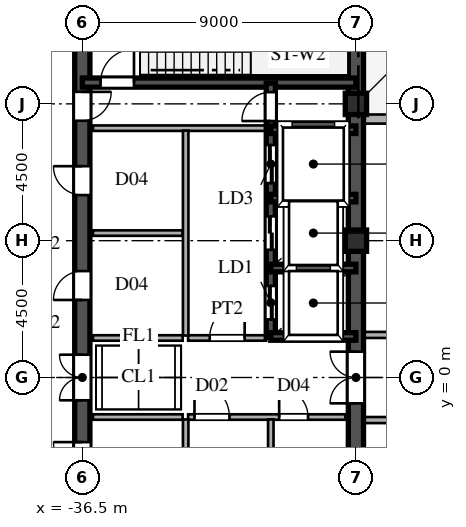
"""IFC4 building model, lengths in metres.
Left out: names, types, materials, properties, quantities, classifications, styles, units other than length and angle.
Written with IfcOpenShell. Run it as: python <this file> out.ifc"""

import sys

from ifc_helpers import new_model, si_unit, direction, frame, frame_2d, origin, origin_2d, place, context, subcontext, project, spatial, rectangle, hollow_rectangle, extrude, source, transform, mapped, element, fill, save


model = new_model("IFC4")
c1 = context("Model", 3, precision=1e-05, world=origin(), true_north=direction((0.0, 1.0)))
c2 = subcontext(c1, "Body", "Model", "MODEL_VIEW")
j1 = project(units=[si_unit("LENGTHUNIT", "METRE"), si_unit("PLANEANGLEUNIT", "RADIAN")], contexts=[c1])
p1 = place(None, origin())
s1 = spatial("IfcSite", under=j1, at=p1, CompositionType="ELEMENT")
p2 = place(p1, origin())
s2 = spatial("IfcBuilding", under=s1, at=p2, CompositionType="ELEMENT")
p3 = place(p2, frame((0.0, 0.0, 274.2)))
s3 = spatial("IfcBuildingStorey", under=s2, at=p3, CompositionType="ELEMENT", Elevation=274.2)
m1 = source(origin(), c2, "Body", "SweptSolid", [
    extrude(hollow_rectangle(XDim=0.7, YDim=0.7, WallThickness=0.03, at=origin_2d()), origin(), (0.0, 0.0, 1.0), 4.8),
])
for number, where, z_axis, x_axis in (
    (1, (-27.5, 4.5, 0.0), (0.0, 0.0, 1.0), (1.0, 0.0, 0.0)),
    (2, (-27.5, 9.0, 0.0), (0.0, 0.0, 1.0), (1.0, 0.0, 0.0)),
):
    element("IfcColumn", number, at=place(p3, frame(where, z_axis=z_axis, x_axis=x_axis)), inside=s3, PredefinedType="COLUMN", context=c2, shape_type="MappedRepresentation", body=[
        mapped(m1, transform((0.0, 0.0, 0.0), scale=1.0)),
    ])
p4 = place(p3, frame((-27.45, 8.5, 0.0), z_axis=(0.0, 0.0, 1.0), x_axis=(1.0, 0.0, 0.0)))
e3 = element("IfcWall", 3, at=p4, inside=s3, PredefinedType="SOLIDWALL", context=c2, shape_type="SweptSolid", body=[
    extrude(rectangle(XDim=54.9, YDim=0.3, at=frame_2d((27.45, 0.0))), origin(), (0.0, 0.0, 1.0), 4.52),
])
p5 = place(p4, frame((12.95, 0.0, 0.0)))
e4 = element("IfcOpeningElement", 4, at=p5, cuts=e3, PredefinedType="OPENING", context=c2, shape_type="SweptSolid", body=[
    extrude(rectangle(XDim=1.9, YDim=2.4, at=frame_2d((0.95, 1.2))), frame((0.0, 0.16, 0.0), z_axis=(0.0, -1.0, 0.0), x_axis=(1.0, 0.0, 0.0)), (0.0, 0.0, 1.0), 0.32),
])
p6 = place(p4, frame((23.95, 0.0, 0.0)))
e5 = element("IfcOpeningElement", 5, at=p6, cuts=e3, PredefinedType="OPENING", context=c2, shape_type="SweptSolid", body=[
    extrude(rectangle(XDim=1.9, YDim=2.4, at=frame_2d((0.95, 1.2))), frame((0.0, 0.16, 0.0), z_axis=(0.0, -1.0, 0.0), x_axis=(1.0, 0.0, 0.0)), (0.0, 0.0, 1.0), 0.32),
])
p7 = place(p4, frame((6.95, 0.0, 0.8)))
e6 = element("IfcOpeningElement", 6, at=p7, cuts=e3, PredefinedType="OPENING", context=c2, shape_type="SweptSolid", body=[
    extrude(rectangle(XDim=2.8, YDim=2.1, at=frame_2d((1.4, 1.05))), frame((0.0, 0.16, 0.0), z_axis=(0.0, -1.0, 0.0), x_axis=(1.0, 0.0, 0.0)), (0.0, 0.0, 1.0), 0.32),
])
p8 = place(p4, frame((17.95, 0.0, 0.8)))
e7 = element("IfcOpeningElement", 7, at=p8, cuts=e3, PredefinedType="OPENING", context=c2, shape_type="SweptSolid", body=[
    extrude(rectangle(XDim=2.8, YDim=2.1, at=frame_2d((1.4, 1.05))), frame((0.0, 0.16, 0.0), z_axis=(0.0, -1.0, 0.0), x_axis=(1.0, 0.0, 0.0)), (0.0, 0.0, 1.0), 0.32),
])
p9 = place(p4, frame((28.95, 0.0, 0.8)))
e8 = element("IfcOpeningElement", 8, at=p9, cuts=e3, PredefinedType="OPENING", context=c2, shape_type="SweptSolid", body=[
    extrude(rectangle(XDim=2.8, YDim=2.1, at=frame_2d((1.4, 1.05))), frame((0.0, 0.16, 0.0), z_axis=(0.0, -1.0, 0.0), x_axis=(1.0, 0.0, 0.0)), (0.0, 0.0, 1.0), 0.32),
])
for number, where, z_axis, x_axis in (
    (9, (-27.5, -13.5, 0.0), (0.0, 0.0, 1.0), (0.0, 1.0, 0.0)),
    (10, (-27.5, 1.3, 0.0), (0.0, 0.0, 1.0), (0.0, 1.0, 0.0)),
):
    element("IfcWall", number, at=place(p3, frame(where, z_axis=z_axis, x_axis=x_axis)), inside=s3, PredefinedType="SHEAR", context=c2, shape_type="SweptSolid", body=[
        extrude(rectangle(XDim=12.2, YDim=0.5, at=frame_2d((6.1, 0.0))), origin(), (0.0, 0.0, 1.0), 4.52),
    ])
p10 = place(p3, frame((-27.5, -1.3, 0.0), z_axis=(0.0, 0.0, 1.0), x_axis=(0.0, 1.0, 0.0)))
e11 = element("IfcWall", 11, at=p10, inside=s3, PredefinedType="SHEAR", context=c2, shape_type="SweptSolid", body=[
    extrude(rectangle(XDim=2.6, YDim=0.5, at=frame_2d((1.3, 0.0))), origin(), (0.0, 0.0, 1.0), 4.52),
])
p11 = place(p10, frame((0.45, 0.0, 0.0)))
e12 = element("IfcOpeningElement", 12, at=p11, cuts=e11, PredefinedType="OPENING", context=c2, shape_type="SweptSolid", body=[
    extrude(rectangle(XDim=1.7, YDim=2.35, at=frame_2d((0.85, 1.175))), frame((0.0, 0.26, 0.0), z_axis=(0.0, -1.0, 0.0), x_axis=(1.0, 0.0, 0.0)), (0.0, 0.0, 1.0), 0.52),
])
p12 = place(p3, frame((-36.5, -1.3, 0.0), z_axis=(0.0, 0.0, 1.0), x_axis=(0.0, 1.0, 0.0)))
e13 = element("IfcWall", 13, at=p12, inside=s3, PredefinedType="SHEAR", context=c2, shape_type="SweptSolid", body=[
    extrude(rectangle(XDim=2.6, YDim=0.5, at=frame_2d((1.3, 0.0))), origin(), (0.0, 0.0, 1.0), 4.52),
])
p13 = place(p12, frame((0.55, 0.0, 0.0)))
e14 = element("IfcOpeningElement", 14, at=p13, cuts=e13, PredefinedType="OPENING", context=c2, shape_type="SweptSolid", body=[
    extrude(rectangle(XDim=1.5, YDim=2.3, at=frame_2d((0.75, 1.15))), frame((0.0, 0.26, 0.0), z_axis=(0.0, -1.0, 0.0), x_axis=(1.0, 0.0, 0.0)), (0.0, 0.0, 1.0), 0.52),
])
p14 = place(p3, frame((-36.5, 8.2, 0.0), z_axis=(0.0, 0.0, 1.0), x_axis=(0.0, 1.0, 0.0)))
e15 = element("IfcWall", 15, at=p14, inside=s3, PredefinedType="SHEAR", context=c2, shape_type="SweptSolid", body=[
    extrude(rectangle(XDim=5.45, YDim=0.5, at=frame_2d((2.725, 0.0))), origin(), (0.0, 0.0, 1.0), 4.52),
])
p15 = place(p14, frame((0.245, 0.0, 0.0)))
e16 = element("IfcOpeningElement", 16, at=p15, cuts=e15, PredefinedType="OPENING", context=c2, shape_type="SweptSolid", body=[
    extrude(rectangle(XDim=0.95, YDim=2.15, at=frame_2d((0.475, 1.075))), frame((0.0, 0.26, 0.0), z_axis=(0.0, -1.0, 0.0), x_axis=(1.0, 0.0, 0.0)), (0.0, 0.0, 1.0), 0.52),
])
p16 = place(p3, frame((-36.5, -3.9, 0.0), z_axis=(0.0, 0.0, 1.0), x_axis=(0.0, 1.0, 0.0)))
e17 = element("IfcWall", 17, at=p16, inside=s3, PredefinedType="SHEAR", context=c2, shape_type="SweptSolid", body=[
    extrude(rectangle(XDim=2.6, YDim=0.5, at=frame_2d((1.3, 0.0))), origin(), (0.0, 0.0, 1.0), 4.52),
])
p17 = place(p16, frame((0.825, 0.0, 0.0)))
e18 = element("IfcOpeningElement", 18, at=p17, cuts=e17, PredefinedType="OPENING", context=c2, shape_type="SweptSolid", body=[
    extrude(rectangle(XDim=0.95, YDim=2.15, at=frame_2d((0.475, 1.075))), frame((0.0, 0.26, 0.0), z_axis=(0.0, -1.0, 0.0), x_axis=(1.0, 0.0, 0.0)), (0.0, 0.0, 1.0), 0.52),
])
p18 = place(p3, frame((-36.5, 1.3, 0.0), z_axis=(0.0, 0.0, 1.0), x_axis=(0.0, 1.0, 0.0)))
e19 = element("IfcWall", 19, at=p18, inside=s3, PredefinedType="SHEAR", context=c2, shape_type="SweptSolid", body=[
    extrude(rectangle(XDim=3.45, YDim=0.5, at=frame_2d((1.725, 0.0))), origin(), (0.0, 0.0, 1.0), 4.52),
])
p19 = place(p18, frame((1.25, 0.0, 0.0)))
e20 = element("IfcOpeningElement", 20, at=p19, cuts=e19, PredefinedType="OPENING", context=c2, shape_type="SweptSolid", body=[
    extrude(rectangle(XDim=0.95, YDim=2.15, at=frame_2d((0.475, 1.075))), frame((0.0, 0.26, 0.0), z_axis=(0.0, -1.0, 0.0), x_axis=(1.0, 0.0, 0.0)), (0.0, 0.0, 1.0), 0.52),
])
p20 = place(p3, frame((-36.5, 4.75, 0.0), z_axis=(0.0, 0.0, 1.0), x_axis=(0.0, 1.0, 0.0)))
e21 = element("IfcWall", 21, at=p20, inside=s3, PredefinedType="SHEAR", context=c2, shape_type="SweptSolid", body=[
    extrude(rectangle(XDim=3.45, YDim=0.5, at=frame_2d((1.725, 0.0))), origin(), (0.0, 0.0, 1.0), 4.52),
])
p21 = place(p20, frame((1.25, 0.0, 0.0)))
e22 = element("IfcOpeningElement", 22, at=p21, cuts=e21, PredefinedType="OPENING", context=c2, shape_type="SweptSolid", body=[
    extrude(rectangle(XDim=0.95, YDim=2.15, at=frame_2d((0.475, 1.075))), frame((0.0, 0.26, 0.0), z_axis=(0.0, -1.0, 0.0), x_axis=(1.0, 0.0, 0.0)), (0.0, 0.0, 1.0), 0.52),
])
p22 = place(p3, frame((-36.5, 9.7, 0.0), z_axis=(0.0, 0.0, 1.0), x_axis=(1.0, 0.0, 0.0)))
e23 = element("IfcWall", 23, at=p22, inside=s3, PredefinedType="SHEAR", context=c2, shape_type="SweptSolid", body=[
    extrude(rectangle(XDim=9.0, YDim=0.3, at=frame_2d((4.5, 0.0))), origin(), (0.0, 0.0, 1.0), 4.52),
])
p23 = place(p22, frame((0.6, 0.0, 0.0)))
e24 = element("IfcOpeningElement", 24, at=p23, cuts=e23, PredefinedType="OPENING", context=c2, shape_type="SweptSolid", body=[
    extrude(rectangle(XDim=1.1, YDim=2.2, at=frame_2d((0.55, 1.1))), frame((0.0, 0.16, 0.0), z_axis=(0.0, -1.0, 0.0), x_axis=(1.0, 0.0, 0.0)), (0.0, 0.0, 1.0), 0.32),
])
for number, where, z_axis, x_axis in (
    (25, (-30.3, 1.35, 0.0), (0.0, 0.0, 1.0), (1.0, 0.0, 0.0)),
    (26, (-30.3, 3.6, 0.0), (0.0, 0.0, 1.0), (1.0, 0.0, 0.0)),
    (27, (-30.3, 5.9, 0.0), (0.0, 0.0, 1.0), (1.0, 0.0, 0.0)),
    (28, (-30.3, 8.15, 0.0), (0.0, 0.0, 1.0), (1.0, 0.0, 0.0)),
):
    element("IfcWall", number, at=place(p3, frame(where, z_axis=z_axis, x_axis=x_axis)), inside=s3, PredefinedType="SHEAR", context=c2, shape_type="SweptSolid", body=[
        extrude(rectangle(XDim=2.8, YDim=0.25, at=frame_2d((1.4, 0.0))), origin(), (0.0, 0.0, 1.0), 4.52),
    ])
p24 = place(p3, frame((-30.3, 1.32, 0.0), z_axis=(0.0, 0.0, 1.0), x_axis=(0.0, 1.0, 0.0)))
e29 = element("IfcWall", 29, at=p24, inside=s3, PredefinedType="SHEAR", context=c2, shape_type="SweptSolid", body=[
    extrude(rectangle(XDim=2.28, YDim=0.3, at=frame_2d((1.14, 0.0))), origin(), (0.0, 0.0, 1.0), 4.52),
])
p25 = place(p24, frame((0.59, 0.0, 0.0)))
e30 = element("IfcOpeningElement", 30, at=p25, cuts=e29, PredefinedType="OPENING", context=c2, shape_type="SweptSolid", body=[
    extrude(rectangle(XDim=1.1, YDim=2.2, at=frame_2d((0.55, 1.1))), frame((0.0, 0.16, 0.0), z_axis=(0.0, -1.0, 0.0), x_axis=(1.0, 0.0, 0.0)), (0.0, 0.0, 1.0), 0.32),
])
p26 = place(p3, frame((-30.3, 3.6, 0.0), z_axis=(0.0, 0.0, 1.0), x_axis=(0.0, 1.0, 0.0)))
e31 = element("IfcWall", 31, at=p26, inside=s3, PredefinedType="SHEAR", context=c2, shape_type="SweptSolid", body=[
    extrude(rectangle(XDim=2.3, YDim=0.3, at=frame_2d((1.15, 0.0))), origin(), (0.0, 0.0, 1.0), 4.52),
])
p27 = place(p26, frame((0.6, 0.0, 0.0)))
e32 = element("IfcOpeningElement", 32, at=p27, cuts=e31, PredefinedType="OPENING", context=c2, shape_type="SweptSolid", body=[
    extrude(rectangle(XDim=1.1, YDim=2.2, at=frame_2d((0.55, 1.1))), frame((0.0, 0.16, 0.0), z_axis=(0.0, -1.0, 0.0), x_axis=(1.0, 0.0, 0.0)), (0.0, 0.0, 1.0), 0.32),
])
p28 = place(p3, frame((-30.3, 5.9, 0.0), z_axis=(0.0, 0.0, 1.0), x_axis=(0.0, 1.0, 0.0)))
e33 = element("IfcWall", 33, at=p28, inside=s3, PredefinedType="SHEAR", context=c2, shape_type="SweptSolid", body=[
    extrude(rectangle(XDim=2.25, YDim=0.3, at=frame_2d((1.125, 0.0))), origin(), (0.0, 0.0, 1.0), 4.52),
])
p29 = place(p28, frame((0.495, 0.0, 0.0)))
e34 = element("IfcOpeningElement", 34, at=p29, cuts=e33, PredefinedType="OPENING", context=c2, shape_type="SweptSolid", body=[
    extrude(rectangle(XDim=1.25, YDim=2.3, at=frame_2d((0.625, 1.15))), frame((0.0, 0.16, 0.0), z_axis=(0.0, -1.0, 0.0), x_axis=(1.0, 0.0, 0.0)), (0.0, 0.0, 1.0), 0.32),
])
p30 = place(p3, frame((-30.3, 8.15, 0.0), z_axis=(0.0, 0.0, 1.0), x_axis=(0.0, 1.0, 0.0)))
e35 = element("IfcWall", 35, at=p30, inside=s3, PredefinedType="SHEAR", context=c2, shape_type="SweptSolid", body=[
    extrude(rectangle(XDim=1.53, YDim=0.3, at=frame_2d((0.765, 0.0))), origin(), (0.0, 0.0, 1.0), 4.52),
])
p31 = place(p30, frame((0.285, 0.0, 0.0)))
e36 = element("IfcOpeningElement", 36, at=p31, cuts=e35, PredefinedType="OPENING", context=c2, shape_type="SweptSolid", body=[
    extrude(rectangle(XDim=0.95, YDim=2.15, at=frame_2d((0.475, 1.075))), frame((0.0, 0.16, 0.0), z_axis=(0.0, -1.0, 0.0), x_axis=(1.0, 0.0, 0.0)), (0.0, 0.0, 1.0), 0.32),
])
p32 = place(p3, frame((-36.15, 8.2, 0.0), z_axis=(0.0, 0.0, 1.0), x_axis=(1.0, 0.0, 0.0)))
e37 = element("IfcWall", 37, at=p32, inside=s3, PredefinedType="PARTITIONING", context=c2, shape_type="SweptSolid", body=[
    extrude(rectangle(XDim=5.7, YDim=0.18, at=frame_2d((2.85, 0.0))), origin(), (0.0, 0.0, 1.0), 4.52),
])
p33 = place(p3, frame((-33.1, -6.42, 0.0), z_axis=(0.0, 0.0, 1.0), x_axis=(0.0, 1.0, 0.0)))
e38 = element("IfcWall", 38, at=p33, inside=s3, PredefinedType="PARTITIONING", context=c2, shape_type="SweptSolid", body=[
    extrude(rectangle(XDim=5.04, YDim=0.18, at=frame_2d((2.52, 0.0))), origin(), (0.0, 0.0, 1.0), 4.52),
])
p34 = place(p3, frame((-33.1, 1.38, 0.0), z_axis=(0.0, 0.0, 1.0), x_axis=(0.0, 1.0, 0.0)))
e39 = element("IfcWall", 39, at=p34, inside=s3, PredefinedType="PARTITIONING", context=c2, shape_type="SweptSolid", body=[
    extrude(rectangle(XDim=6.74, YDim=0.18, at=frame_2d((3.37, 0.0))), origin(), (0.0, 0.0, 1.0), 4.52),
])
p35 = place(p3, frame((-30.3, -1.3, 0.0), z_axis=(0.0, 0.0, 1.0), x_axis=(1.0, 0.0, 0.0)))
e40 = element("IfcWall", 40, at=p35, inside=s3, PredefinedType="PARTITIONING", context=c2, shape_type="SweptSolid", body=[
    extrude(rectangle(XDim=2.45, YDim=0.18, at=frame_2d((1.225, 0.0))), origin(), (0.0, 0.0, 1.0), 4.52),
])
p36 = place(p35, frame((0.275, 0.0, 0.0)))
e41 = element("IfcOpeningElement", 41, at=p36, cuts=e40, PredefinedType="OPENING", context=c2, shape_type="SweptSolid", body=[
    extrude(rectangle(XDim=0.95, YDim=2.15, at=frame_2d((0.475, 1.075))), frame((0.0, 0.1, 0.0), z_axis=(0.0, -1.0, 0.0), x_axis=(1.0, 0.0, 0.0)), (0.0, 0.0, 1.0), 0.2),
])
p37 = place(p3, frame((-33.02, -1.3, 0.0), z_axis=(0.0, 0.0, 1.0), x_axis=(1.0, 0.0, 0.0)))
e42 = element("IfcWall", 42, at=p37, inside=s3, PredefinedType="PARTITIONING", context=c2, shape_type="SweptSolid", body=[
    extrude(rectangle(XDim=2.72, YDim=0.18, at=frame_2d((1.36, 0.0))), origin(), (0.0, 0.0, 1.0), 4.52),
])
p38 = place(p37, frame((0.21, 0.0, 0.0)))
e43 = element("IfcOpeningElement", 43, at=p38, cuts=e42, PredefinedType="OPENING", context=c2, shape_type="SweptSolid", body=[
    extrude(rectangle(XDim=1.15, YDim=2.2, at=frame_2d((0.575, 1.1))), frame((0.0, 0.1, 0.0), z_axis=(0.0, -1.0, 0.0), x_axis=(1.0, 0.0, 0.0)), (0.0, 0.0, 1.0), 0.2),
])
p39 = place(p3, frame((-30.3, -7.12, 0.0), z_axis=(0.0, 0.0, 1.0), x_axis=(0.0, 1.0, 0.0)))
e44 = element("IfcWall", 44, at=p39, inside=s3, PredefinedType="PARTITIONING", context=c2, shape_type="SweptSolid", body=[
    extrude(rectangle(XDim=5.74, YDim=0.18, at=frame_2d((2.87, 0.0))), origin(), (0.0, 0.0, 1.0), 4.52),
])
p40 = place(p3, frame((-33.02, 1.3, 0.0), z_axis=(0.0, 0.0, 1.0), x_axis=(1.0, 0.0, 0.0)))
e45 = element("IfcWall", 45, at=p40, inside=s3, PredefinedType="PARTITIONING", context=c2, shape_type="SweptSolid", body=[
    extrude(rectangle(XDim=2.57, YDim=0.18, at=frame_2d((1.285, 0.0))), origin(), (0.0, 0.0, 1.0), 4.52),
])
p41 = place(p40, frame((0.71, 0.0, 0.0)))
e46 = element("IfcOpeningElement", 46, at=p41, cuts=e45, PredefinedType="OPENING", context=c2, shape_type="SweptSolid", body=[
    extrude(rectangle(XDim=1.15, YDim=2.2, at=frame_2d((0.575, 1.1))), frame((0.0, 0.1, 0.0), z_axis=(0.0, -1.0, 0.0), x_axis=(1.0, 0.0, 0.0)), (0.0, 0.0, 1.0), 0.2),
])
for number, where, z_axis, x_axis in (
    (47, (-36.15, -1.3, 0.0), (0.0, 0.0, 1.0), (1.0, 0.0, 0.0)),
    (48, (-36.15, 1.3, 0.0), (0.0, 0.0, 1.0), (1.0, 0.0, 0.0)),
    (49, (-36.15, 4.75, 0.0), (0.0, 0.0, 1.0), (1.0, 0.0, 0.0)),
):
    element("IfcWall", number, at=place(p3, frame(where, z_axis=z_axis, x_axis=x_axis)), inside=s3, PredefinedType="PARTITIONING", context=c2, shape_type="SweptSolid", body=[
        extrude(rectangle(XDim=2.95, YDim=0.18, at=frame_2d((1.475, 0.0))), origin(), (0.0, 0.0, 1.0), 4.52),
    ])
p42 = place(p3, frame((-27.245, -1.4, 0.0), z_axis=(0.0, 0.0, 1.0), x_axis=(1.0, 0.0, 0.0)))
e50 = element("IfcWall", 50, at=p42, inside=s3, PredefinedType="PARTITIONING", context=c2, shape_type="SweptSolid", body=[
    extrude(rectangle(XDim=54.49, YDim=0.2, at=frame_2d((27.245, 0.0))), origin(), (0.0, 0.0, 1.0), 4.52),
])
p43 = place(p42, frame((17.67, 0.0, 0.0)))
e51 = element("IfcOpeningElement", 51, at=p43, cuts=e50, PredefinedType="OPENING", context=c2, shape_type="SweptSolid", body=[
    extrude(rectangle(XDim=1.15, YDim=2.2, at=frame_2d((0.575, 1.1))), frame((0.0, 0.11, 0.0), z_axis=(0.0, -1.0, 0.0), x_axis=(1.0, 0.0, 0.0)), (0.0, 0.0, 1.0), 0.22),
])
p44 = place(p42, frame((35.17, 0.0, 0.0)))
e52 = element("IfcOpeningElement", 52, at=p44, cuts=e50, PredefinedType="OPENING", context=c2, shape_type="SweptSolid", body=[
    extrude(rectangle(XDim=1.15, YDim=2.2, at=frame_2d((0.575, 1.1))), frame((0.0, 0.11, 0.0), z_axis=(0.0, -1.0, 0.0), x_axis=(1.0, 0.0, 0.0)), (0.0, 0.0, 1.0), 0.22),
])
p45 = place(p3, frame((-27.245, 1.4, 0.0), z_axis=(0.0, 0.0, 1.0), x_axis=(1.0, 0.0, 0.0)))
e53 = element("IfcWall", 53, at=p45, inside=s3, PredefinedType="PARTITIONING", context=c2, shape_type="SweptSolid", body=[
    extrude(rectangle(XDim=54.49, YDim=0.2, at=frame_2d((27.245, 0.0))), origin(), (0.0, 0.0, 1.0), 4.52),
])
p46 = place(p45, frame((17.67, 0.0, 0.0)))
e54 = element("IfcOpeningElement", 54, at=p46, cuts=e53, PredefinedType="OPENING", context=c2, shape_type="SweptSolid", body=[
    extrude(rectangle(XDim=1.15, YDim=2.2, at=frame_2d((0.575, 1.1))), frame((0.0, 0.11, 0.0), z_axis=(0.0, -1.0, 0.0), x_axis=(1.0, 0.0, 0.0)), (0.0, 0.0, 1.0), 0.22),
])
p47 = place(p45, frame((41.805, 0.0, 0.0)))
e55 = element("IfcOpeningElement", 55, at=p47, cuts=e53, PredefinedType="OPENING", context=c2, shape_type="SweptSolid", body=[
    extrude(rectangle(XDim=0.88, YDim=2.1, at=frame_2d((0.44, 1.05))), frame((0.0, 0.11, 0.0), z_axis=(0.0, -1.0, 0.0), x_axis=(1.0, 0.0, 0.0)), (0.0, 0.0, 1.0), 0.22),
])
p48 = place(p45, frame((49.905, 0.0, 0.0)))
e56 = element("IfcOpeningElement", 56, at=p48, cuts=e53, PredefinedType="OPENING", context=c2, shape_type="SweptSolid", body=[
    extrude(rectangle(XDim=0.88, YDim=2.1, at=frame_2d((0.44, 1.05))), frame((0.0, 0.11, 0.0), z_axis=(0.0, -1.0, 0.0), x_axis=(1.0, 0.0, 0.0)), (0.0, 0.0, 1.0), 0.22),
])
m2 = source(origin(), c2, "Body", "SweptSolid", [
    extrude(rectangle(XDim=1.7, YDim=2.35, at=frame_2d((0.85, 1.175))), frame((0.0, 0.025, 0.0), z_axis=(0.0, -1.0, 0.0), x_axis=(1.0, 0.0, 0.0)), (0.0, 0.0, 1.0), 0.05),
])
p49 = place(p11, origin())
e57 = element("IfcDoor", 57, at=p49, inside=s3, OperationType="DOUBLE_SWING_LEFT", PredefinedType="DOOR", context=c2, shape_type="MappedRepresentation", body=[
    mapped(m2, transform((0.0, 0.0, 0.0), scale=1.0)),
])
fill(e12, e57)
m3 = source(origin(), c2, "Body", "SweptSolid", [
    extrude(rectangle(XDim=1.5, YDim=2.3, at=frame_2d((0.75, 1.15))), frame((0.0, 0.025, 0.0), z_axis=(0.0, -1.0, 0.0), x_axis=(1.0, 0.0, 0.0)), (0.0, 0.0, 1.0), 0.05),
])
p50 = place(p13, origin())
e58 = element("IfcDoor", 58, at=p50, inside=s3, OperationType="DOUBLE_SWING_LEFT", PredefinedType="DOOR", context=c2, shape_type="MappedRepresentation", body=[
    mapped(m3, transform((0.0, 0.0, 0.0), scale=1.0)),
])
fill(e14, e58)
m4 = source(origin(), c2, "Body", "SweptSolid", [
    extrude(rectangle(XDim=0.95, YDim=2.15, at=frame_2d((0.475, 1.075))), frame((0.0, 0.025, 0.0), z_axis=(0.0, -1.0, 0.0), x_axis=(1.0, 0.0, 0.0)), (0.0, 0.0, 1.0), 0.05),
])
p51 = place(p15, frame((0.95, 0.0, 0.0), z_axis=(0.0, 0.0, 1.0), x_axis=(-1.0, 0.0, 0.0)))
e59 = element("IfcDoor", 59, at=p51, inside=s3, OperationType="SINGLE_SWING_RIGHT", PredefinedType="DOOR", context=c2, shape_type="MappedRepresentation", body=[
    mapped(m4, transform((0.0, 0.0, 0.0), scale=1.0)),
])
fill(e16, e59)
p52 = place(p17, origin())
e60 = element("IfcDoor", 60, at=p52, inside=s3, OperationType="SINGLE_SWING_RIGHT", PredefinedType="DOOR", context=c2, shape_type="MappedRepresentation", body=[
    mapped(m4, transform((0.0, 0.0, 0.0), scale=1.0)),
])
fill(e18, e60)
p53 = place(p19, origin())
e61 = element("IfcDoor", 61, at=p53, inside=s3, OperationType="SINGLE_SWING_LEFT", PredefinedType="DOOR", context=c2, shape_type="MappedRepresentation", body=[
    mapped(m4, transform((0.0, 0.0, 0.0), scale=1.0)),
])
fill(e20, e61)
p54 = place(p21, origin())
e62 = element("IfcDoor", 62, at=p54, inside=s3, OperationType="SINGLE_SWING_RIGHT", PredefinedType="DOOR", context=c2, shape_type="MappedRepresentation", body=[
    mapped(m4, transform((0.0, 0.0, 0.0), scale=1.0)),
])
fill(e22, e62)
m5 = source(origin(), c2, "Body", "SweptSolid", [
    extrude(rectangle(XDim=1.1, YDim=2.2, at=frame_2d((0.55, 1.1))), frame((0.0, 0.025, 0.0), z_axis=(0.0, -1.0, 0.0), x_axis=(1.0, 0.0, 0.0)), (0.0, 0.0, 1.0), 0.05),
])
p55 = place(p23, origin())
e63 = element("IfcDoor", 63, at=p55, inside=s3, OperationType="SINGLE_SWING_RIGHT", PredefinedType="DOOR", context=c2, shape_type="MappedRepresentation", body=[
    mapped(m5, transform((0.0, 0.0, 0.0), scale=1.0)),
])
fill(e24, e63)
m6 = source(origin(), c2, "Body", "SweptSolid", [
    extrude(rectangle(XDim=1.1, YDim=2.2, at=frame_2d((0.55, 1.1))), frame((0.0, 0.025, 0.0), z_axis=(0.0, -1.0, 0.0), x_axis=(1.0, 0.0, 0.0)), (0.0, 0.0, 1.0), 0.05),
])
p56 = place(p25, origin())
e64 = element("IfcDoor", 64, at=p56, inside=s3, OperationType="DOUBLE_DOOR_SLIDING", PredefinedType="DOOR", context=c2, shape_type="MappedRepresentation", body=[
    mapped(m6, transform((0.0, 0.0, 0.0), scale=1.0)),
])
fill(e30, e64)
p57 = place(p27, origin())
e65 = element("IfcDoor", 65, at=p57, inside=s3, OperationType="DOUBLE_DOOR_SLIDING", PredefinedType="DOOR", context=c2, shape_type="MappedRepresentation", body=[
    mapped(m6, transform((0.0, 0.0, 0.0), scale=1.0)),
])
fill(e32, e65)
m7 = source(origin(), c2, "Body", "SweptSolid", [
    extrude(rectangle(XDim=1.25, YDim=2.3, at=frame_2d((0.625, 1.15))), frame((0.0, 0.025, 0.0), z_axis=(0.0, -1.0, 0.0), x_axis=(1.0, 0.0, 0.0)), (0.0, 0.0, 1.0), 0.05),
])
p58 = place(p29, origin())
e66 = element("IfcDoor", 66, at=p58, inside=s3, OperationType="DOUBLE_DOOR_SLIDING", PredefinedType="DOOR", context=c2, shape_type="MappedRepresentation", body=[
    mapped(m7, transform((0.0, 0.0, 0.0), scale=1.0)),
])
fill(e34, e66)
p59 = place(p31, origin())
e67 = element("IfcDoor", 67, at=p59, inside=s3, OperationType="SINGLE_SWING_LEFT", PredefinedType="DOOR", context=c2, shape_type="MappedRepresentation", body=[
    mapped(m4, transform((0.0, 0.0, 0.0), scale=1.0)),
])
fill(e36, e67)
p60 = place(p36, origin())
e68 = element("IfcDoor", 68, at=p60, inside=s3, OperationType="SINGLE_SWING_LEFT", PredefinedType="DOOR", context=c2, shape_type="MappedRepresentation", body=[
    mapped(m4, transform((0.0, 0.0, 0.0), scale=1.0)),
])
fill(e41, e68)
m8 = source(origin(), c2, "Body", "SweptSolid", [
    extrude(rectangle(XDim=1.15, YDim=2.2, at=frame_2d((0.575, 1.1))), frame((0.0, 0.025, 0.0), z_axis=(0.0, -1.0, 0.0), x_axis=(1.0, 0.0, 0.0)), (0.0, 0.0, 1.0), 0.05),
])
p61 = place(p38, origin())
e69 = element("IfcDoor", 69, at=p61, inside=s3, OperationType="SINGLE_SWING_LEFT", PredefinedType="DOOR", context=c2, shape_type="MappedRepresentation", body=[
    mapped(m8, transform((0.0, 0.0, 0.0), scale=1.0)),
])
fill(e43, e69)
p62 = place(p41, origin())
e70 = element("IfcDoor", 70, at=p62, inside=s3, OperationType="SINGLE_SWING_RIGHT", PredefinedType="DOOR", context=c2, shape_type="MappedRepresentation", body=[
    mapped(m8, transform((0.0, 0.0, 0.0), scale=1.0)),
])
fill(e46, e70)
save(model, sys.argv[1])
